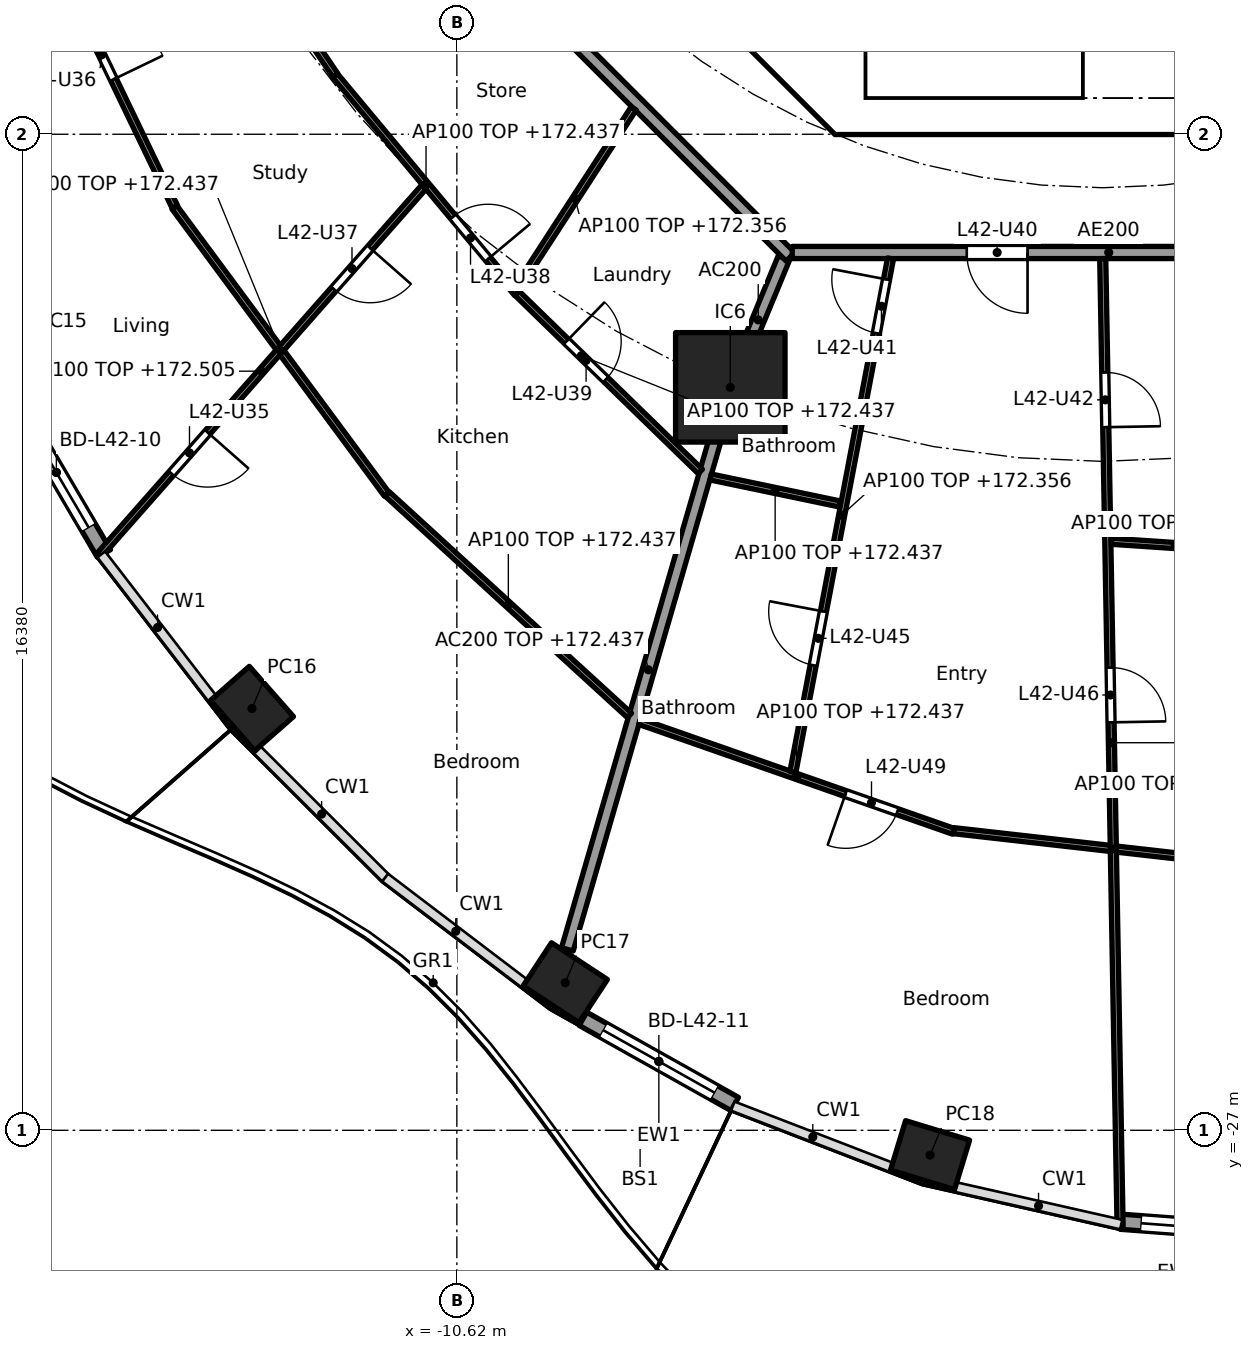
"""IFC4 building model, lengths in metres.
Left out: names, types, materials, properties, quantities, classifications, styles, units other than length and angle.
Written with IfcOpenShell. Run it as: python <this file> out.ifc"""

import sys

from ifc_helpers import new_model, si_unit, direction, frame, frame_2d, origin, origin_2d, place, context, subcontext, project, spatial, polyline, rectangle, hollow_rectangle, outline, extrude, element, fill, save


model = new_model("IFC4")
c1 = context("Model", 3, precision=1e-05, world=origin(), true_north=direction((0.0, 1.0)))
c2 = subcontext(c1, "Body", "Model", "MODEL_VIEW")
j1 = project(units=[si_unit("LENGTHUNIT", "METRE"), si_unit("PLANEANGLEUNIT", "RADIAN")], contexts=[c1])
p1 = place(None, origin())
s1 = spatial("IfcSite", under=j1, at=p1, CompositionType="ELEMENT")
p2 = place(p1, origin())
s2 = spatial("IfcBuilding", under=s1, at=p2, CompositionType="ELEMENT")
p3 = place(p2, frame((0.0, 0.0, 169.6)))
s3 = spatial("IfcBuildingStorey", under=s2, at=p3, CompositionType="ELEMENT", Elevation=169.6)
for number, where, z_axis, x_axis in (
    (1, (-13.989, -20.064, 0.0), (0.0, 0.0, 1.0), (0.66, -0.751, 0.0)),
    (2, (-8.837, -24.573, 0.0), (0.0, 0.0, 1.0), (0.836, -0.549, 0.0)),
    (3, (-2.838, -27.408, 0.0), (0.0, 0.0, 1.0), (0.957, -0.292, 0.0)),
):
    element("IfcColumn", number, at=place(p3, frame(where, z_axis=z_axis, x_axis=x_axis)), inside=s3, PredefinedType="COLUMN", context=c2, shape_type="SweptSolid", body=[
        extrude(hollow_rectangle(XDim=1.1, YDim=0.85, WallThickness=0.036, at=origin_2d()), origin(), (0.0, 0.0, 1.0), 3.7),
    ])
p4 = place(p3, frame((-6.123, -14.782, 0.0), z_axis=(0.0, 0.0, 1.0), x_axis=(1.0, 0.0, 0.0)))
e4 = element("IfcColumn", 4, at=p4, inside=s3, PredefinedType="COLUMN", context=c2, shape_type="SweptSolid", body=[
    extrude(rectangle(XDim=1.8, YDim=1.8, at=origin_2d()), origin(), (0.0, 0.0, 1.0), 3.7),
])
p5 = place(p3, frame((-16.424, -17.515, 0.0), z_axis=(0.0, 0.0, 1.0), x_axis=(-0.506309086483, 0.862352079458, 0.0)))
e5 = element("IfcWall", 5, at=p5, inside=s3, PredefinedType="SOLIDWALL", context=c2, shape_type="SweptSolid", body=[
    extrude(rectangle(XDim=3.092, YDim=0.25, at=frame_2d((1.546, 0.0))), origin(), (0.0, 0.0, 1.0), 3.44),
])
p6 = place(p5, frame((0.496, 0.0, 0.0)))
e6 = element("IfcOpeningElement", 6, at=p6, cuts=e5, PredefinedType="OPENING", context=c2, shape_type="SweptSolid", body=[
    extrude(rectangle(XDim=2.1, YDim=2.4, at=frame_2d((1.05, 1.2))), frame((0.0, 0.135, 0.0), z_axis=(0.0, -1.0, 0.0), x_axis=(1.0, 0.0, 0.0)), (0.0, 0.0, 1.0), 0.27),
])
p7 = place(p3, frame((-6.049, -26.568, 0.0), z_axis=(0.0, 0.0, 1.0), x_axis=(-0.872078262455, 0.489366431371, 0.0)))
e7 = element("IfcWall", 7, at=p7, inside=s3, PredefinedType="SOLIDWALL", context=c2, shape_type="SweptSolid", body=[
    extrude(rectangle(XDim=2.864, YDim=0.25, at=frame_2d((1.432, 0.0))), origin(), (0.0, 0.0, 1.0), 3.44),
])
p8 = place(p7, frame((0.382, 0.0, 0.0)))
e8 = element("IfcOpeningElement", 8, at=p8, cuts=e7, PredefinedType="OPENING", context=c2, shape_type="SweptSolid", body=[
    extrude(rectangle(XDim=2.1, YDim=2.4, at=frame_2d((1.05, 1.2))), frame((0.0, 0.135, 0.0), z_axis=(0.0, -1.0, 0.0), x_axis=(1.0, 0.0, 0.0)), (0.0, 0.0, 1.0), 0.27),
])
p9 = place(p3, frame((3.061, -28.709, 0.0), z_axis=(0.0, 0.0, 1.0), x_axis=(-0.997232064422, 0.074351931305, 0.0)))
e9 = element("IfcWall", 9, at=p9, inside=s3, PredefinedType="SOLIDWALL", context=c2, shape_type="SweptSolid", body=[
    extrude(rectangle(XDim=2.771, YDim=0.25, at=frame_2d((1.386, 0.0))), origin(), (0.0, 0.0, 1.0), 3.44),
])
p10 = place(p9, frame((0.336, 0.0, 0.0)))
e10 = element("IfcOpeningElement", 10, at=p10, cuts=e9, PredefinedType="OPENING", context=c2, shape_type="SweptSolid", body=[
    extrude(rectangle(XDim=2.1, YDim=2.4, at=frame_2d((1.05, 1.2))), frame((0.0, 0.135, 0.0), z_axis=(0.0, -1.0, 0.0), x_axis=(1.0, 0.0, 0.0)), (0.0, 0.0, 1.0), 0.27),
])
p11 = place(p3, frame((-9.988, -4.613, 0.0), z_axis=(0.0, 0.0, 1.0), x_axis=(0.707106781187, -0.707106781187, 0.0)))
e11 = element("IfcWall", 11, at=p11, inside=s3, PredefinedType="SHEAR", context=c2, shape_type="SweptSolid", body=[
    extrude(rectangle(XDim=7.602, YDim=0.6, at=frame_2d((3.801, 0.0))), origin(), (0.0, 0.0, 1.0), 3.44),
])
p12 = place(p11, frame((6.151, 0.0, 0.0)))
e12 = element("IfcOpeningElement", 12, at=p12, cuts=e11, PredefinedType="OPENING", context=c2, shape_type="SweptSolid", body=[
    extrude(rectangle(XDim=1.1, YDim=2.1, at=frame_2d((0.55, 1.05))), frame((0.0, 0.31, 0.0), z_axis=(0.0, -1.0, 0.0), x_axis=(1.0, 0.0, 0.0)), (0.0, 0.0, 1.0), 0.62),
])
p13 = place(p3, origin())
e13 = element("IfcWall", 13, at=p13, inside=s3, PredefinedType="SHEAR", context=c2, shape_type="SweptSolid", body=[
    extrude(outline(polyline([(-4.152, -10.025), (4.152, -10.025), (4.401, -9.776), (4.825, -10.2), (4.401, -10.625), (-4.401, -10.625), (-4.825, -10.2), (-4.401, -9.776), (-4.152, -10.025)])), origin(), (0.0, 0.0, 1.0), 3.44),
])
p14 = place(p3, origin())
e14 = element("IfcWall", 14, at=p14, inside=s3, PredefinedType="SOLIDWALL", context=c2, shape_type="SweptSolid", body=[
    extrude(outline(polyline([(-3.9, -10.025), (-4.1, -10.025), (-4.1, -7.025), (-3.9, -7.025), (-3.9, -10.025)])), origin(), (0.0, 0.0, 1.0), 3.44),
])
p15 = place(p3, frame((-5.243, -12.657, 0.0), z_axis=(0.0, 0.0, 1.0), x_axis=(-0.382707856524, -0.923869415315, 0.0)))
e15 = element("IfcWall", 15, at=p15, inside=s3, PredefinedType="PARTITIONING", context=c2, shape_type="SweptSolid", body=[
    extrude(rectangle(XDim=2.2, YDim=0.2, at=frame_2d((1.1, 0.0))), origin(), (0.0, 0.0, 1.0), 3.44),
])
p16 = place(p3, frame((-6.137, -14.83, 0.0), z_axis=(0.0, 0.0, 1.0), x_axis=(-0.278461169897, -0.96044748782, 0.0)))
e16 = element("IfcWall", 16, at=p16, inside=s3, PredefinedType="PARTITIONING", context=c2, shape_type="SweptSolid", body=[
    extrude(rectangle(XDim=9.573, YDim=0.2, at=frame_2d((4.787, 0.0))), origin(), (0.0, 0.0, 1.0), 2.837),
])
p17 = place(p3, frame((-12.635, -5.134, 0.0), z_axis=(0.0, 0.0, 1.0), x_axis=(0.707106781187, -0.707106781187, 0.0)))
e17 = element("IfcWall", 17, at=p17, inside=s3, PredefinedType="PARTITIONING", context=c2, shape_type="SweptSolid", body=[
    extrude(rectangle(XDim=10.609, YDim=0.2, at=frame_2d((5.305, 0.0))), origin(), (0.0, 0.0, 1.0), 3.44),
])
p18 = place(p3, frame((-5.104, -12.565, 0.0), z_axis=(0.0, 0.0, 1.0), x_axis=(1.0, 0.0, 0.0)))
e18 = element("IfcWall", 18, at=p18, inside=s3, PredefinedType="PARTITIONING", context=c2, shape_type="SweptSolid", body=[
    extrude(rectangle(XDim=10.409, YDim=0.2, at=frame_2d((5.205, 0.0))), origin(), (0.0, 0.0, 1.0), 3.44),
])
p19 = place(p18, frame((2.87, 0.0, 0.0)))
e19 = element("IfcOpeningElement", 19, at=p19, cuts=e18, PredefinedType="OPENING", context=c2, shape_type="SweptSolid", body=[
    extrude(rectangle(XDim=1.0, YDim=2.1, at=frame_2d((0.5, 1.05))), frame((0.0, 0.11, 0.0), z_axis=(0.0, -1.0, 0.0), x_axis=(1.0, 0.0, 0.0)), (0.0, 0.0, 1.0), 0.22),
])
p20 = place(p3, frame((-14.952, -6.208, 0.0), z_axis=(0.0, 0.0, 1.0), x_axis=(0.561064907171, -0.827771810308, 0.0)))
e20 = element("IfcWall", 20, at=p20, inside=s3, PredefinedType="PARTITIONING", context=c2, shape_type="SweptSolid", body=[
    extrude(rectangle(XDim=4.159, YDim=0.1, at=frame_2d((2.079, 0.0))), origin(), (0.0, 0.0, 1.0), 3.44),
])
p21 = place(p3, frame((-17.669, -6.809, 0.0), z_axis=(0.0, 0.0, 1.0), x_axis=(0.434040130629, -0.900893536997, 0.0)))
e21 = element("IfcWall", 21, at=p21, inside=s3, PredefinedType="PARTITIONING", context=c2, shape_type="SweptSolid", body=[
    extrude(rectangle(XDim=5.558, YDim=0.1, at=frame_2d((2.779, 0.0))), origin(), (0.0, 0.0, 1.0), 3.44),
])
p22 = place(p21, frame((2.329, 0.0, 0.0)))
e22 = element("IfcOpeningElement", 22, at=p22, cuts=e21, PredefinedType="OPENING", context=c2, shape_type="SweptSolid", body=[
    extrude(rectangle(XDim=0.9, YDim=2.1, at=frame_2d((0.45, 1.05))), frame((0.0, 0.06, 0.0), z_axis=(0.0, -1.0, 0.0), x_axis=(1.0, 0.0, 0.0)), (0.0, 0.0, 1.0), 0.12),
])
p23 = place(p3, frame((-12.623, -9.653, 0.0), z_axis=(0.0, 0.0, 1.0), x_axis=(0.640297481347, -0.768127030758, 0.0)))
e23 = element("IfcWall", 23, at=p23, inside=s3, PredefinedType="PARTITIONING", context=c2, shape_type="SweptSolid", body=[
    extrude(rectangle(XDim=4.672, YDim=0.1, at=frame_2d((2.336, 0.0))), origin(), (0.0, 0.0, 1.0), 2.837),
])
p24 = place(p23, frame((3.029, 0.0, 0.0)))
e24 = element("IfcOpeningElement", 24, at=p24, cuts=e23, PredefinedType="OPENING", context=c2, shape_type="SweptSolid", body=[
    extrude(rectangle(XDim=0.9, YDim=2.1, at=frame_2d((0.45, 1.05))), frame((0.0, 0.06, 0.0), z_axis=(0.0, -1.0, 0.0), x_axis=(1.0, 0.0, 0.0)), (0.0, 0.0, 1.0), 0.12),
])
p25 = place(p3, frame((-15.265, -11.821, 0.0), z_axis=(0.0, 0.0, 1.0), x_axis=(0.594711348772, -0.803939308432, 0.0)))
e25 = element("IfcWall", 25, at=p25, inside=s3, PredefinedType="PARTITIONING", context=c2, shape_type="SweptSolid", body=[
    extrude(rectangle(XDim=5.872, YDim=0.1, at=frame_2d((2.936, 0.0))), origin(), (0.0, 0.0, 1.0), 2.837),
])
p26 = place(p3, frame((-11.16, -11.485, 0.0), z_axis=(0.0, 0.0, 1.0), x_axis=(-0.661275898802, -0.750142776852, 0.0)))
e26 = element("IfcWall", 26, at=p26, inside=s3, PredefinedType="PARTITIONING", context=c2, shape_type="SweptSolid", body=[
    extrude(rectangle(XDim=8.083, YDim=0.1, at=frame_2d((4.041, 0.0))), origin(), (0.0, 0.0, 1.0), 2.905),
])
p27 = place(p26, frame((5.382, 0.0, 0.0)))
e27 = element("IfcOpeningElement", 27, at=p27, cuts=e26, PredefinedType="OPENING", context=c2, shape_type="SweptSolid", body=[
    extrude(rectangle(XDim=0.9, YDim=2.1, at=frame_2d((0.45, 1.05))), frame((0.0, 0.06, 0.0), z_axis=(0.0, -1.0, 0.0), x_axis=(1.0, 0.0, 0.0)), (0.0, 0.0, 1.0), 0.12),
])
p28 = place(p26, frame((1.341, 0.0, 0.0)))
e28 = element("IfcOpeningElement", 28, at=p28, cuts=e26, PredefinedType="OPENING", context=c2, shape_type="SweptSolid", body=[
    extrude(rectangle(XDim=0.9, YDim=2.1, at=frame_2d((0.45, 1.05))), frame((0.0, 0.06, 0.0), z_axis=(0.0, -1.0, 0.0), x_axis=(1.0, 0.0, 0.0)), (0.0, 0.0, 1.0), 0.12),
])
p29 = place(p3, frame((-7.712, -10.195, 0.0), z_axis=(0.0, 0.0, 1.0), x_axis=(-0.544170086001, -0.838974920663, 0.0)))
e29 = element("IfcWall", 29, at=p29, inside=s3, PredefinedType="PARTITIONING", context=c2, shape_type="SweptSolid", body=[
    extrude(rectangle(XDim=3.535, YDim=0.1, at=frame_2d((1.768, 0.0))), origin(), (0.0, 0.0, 1.0), 2.756),
])
p30 = place(p3, frame((-9.627, -13.238, 0.0), z_axis=(0.0, 0.0, 1.0), x_axis=(0.716919058692, -0.697156412352, 0.0)))
e30 = element("IfcWall", 30, at=p30, inside=s3, PredefinedType="PARTITIONING", context=c2, shape_type="SweptSolid", body=[
    extrude(rectangle(XDim=4.2, YDim=0.1, at=frame_2d((2.1, 0.0))), origin(), (0.0, 0.0, 1.0), 2.837),
])
p31 = place(p30, frame((1.13, 0.0, 0.0)))
e31 = element("IfcOpeningElement", 31, at=p31, cuts=e30, PredefinedType="OPENING", context=c2, shape_type="SweptSolid", body=[
    extrude(rectangle(XDim=0.9, YDim=2.1, at=frame_2d((0.45, 1.05))), frame((0.0, 0.06, 0.0), z_axis=(0.0, -1.0, 0.0), x_axis=(1.0, 0.0, 0.0)), (0.0, 0.0, 1.0), 0.12),
])
p32 = place(p3, frame((-11.766, -16.535, 0.0), z_axis=(0.0, 0.0, 1.0), x_axis=(0.73807320557, -0.674720640872, 0.0)))
e32 = element("IfcWall", 32, at=p32, inside=s3, PredefinedType="PARTITIONING", context=c2, shape_type="SweptSolid", body=[
    extrude(rectangle(XDim=5.399, YDim=0.1, at=frame_2d((2.699, 0.0))), origin(), (0.0, 0.0, 1.0), 2.837),
])
p33 = place(p3, frame((-6.447, -16.256, 0.0), z_axis=(0.0, 0.0, 1.0), x_axis=(0.978909151576, -0.204296042448, 0.0)))
e33 = element("IfcWall", 33, at=p33, inside=s3, PredefinedType="PARTITIONING", context=c2, shape_type="SweptSolid", body=[
    extrude(rectangle(XDim=2.168, YDim=0.1, at=frame_2d((1.084, 0.0))), origin(), (0.0, 0.0, 1.0), 2.837),
])
p34 = place(p3, frame((-7.613, -20.278, 0.0), z_axis=(0.0, 0.0, 1.0), x_axis=(0.943918212431, -0.330179357684, 0.0)))
e34 = element("IfcWall", 34, at=p34, inside=s3, PredefinedType="PARTITIONING", context=c2, shape_type="SweptSolid", body=[
    extrude(rectangle(XDim=5.467, YDim=0.1, at=frame_2d((2.734, 0.0))), origin(), (0.0, 0.0, 1.0), 2.837),
])
p35 = place(p34, frame((3.588, 0.0, 0.0)))
e35 = element("IfcOpeningElement", 35, at=p35, cuts=e34, PredefinedType="OPENING", context=c2, shape_type="SweptSolid", body=[
    extrude(rectangle(XDim=0.9, YDim=2.1, at=frame_2d((0.45, 1.05))), frame((0.0, 0.06, 0.0), z_axis=(0.0, -1.0, 0.0), x_axis=(1.0, 0.0, 0.0)), (0.0, 0.0, 1.0), 0.12),
])
p36 = place(p3, frame((-3.488, -12.663, 0.0), z_axis=(0.0, 0.0, 1.0), x_axis=(-0.186783185485, -0.982401161247, 0.0)))
e36 = element("IfcWall", 36, at=p36, inside=s3, PredefinedType="PARTITIONING", context=c2, shape_type="SweptSolid", body=[
    extrude(rectangle(XDim=8.595, YDim=0.1, at=frame_2d((4.298, 0.0))), origin(), (0.0, 0.0, 1.0), 2.756),
])
p37 = place(p36, frame((0.35, 0.0, 0.0)))
e37 = element("IfcOpeningElement", 37, at=p37, cuts=e36, PredefinedType="OPENING", context=c2, shape_type="SweptSolid", body=[
    extrude(rectangle(XDim=0.9, YDim=2.1, at=frame_2d((0.45, 1.05))), frame((0.0, 0.06, 0.0), z_axis=(0.0, -1.0, 0.0), x_axis=(1.0, 0.0, 0.0)), (0.0, 0.0, 1.0), 0.12),
])
p38 = place(p36, frame((5.908, 0.0, 0.0)))
e38 = element("IfcOpeningElement", 38, at=p38, cuts=e36, PredefinedType="OPENING", context=c2, shape_type="SweptSolid", body=[
    extrude(rectangle(XDim=0.9, YDim=2.1, at=frame_2d((0.45, 1.05))), frame((0.0, 0.06, 0.0), z_axis=(0.0, -1.0, 0.0), x_axis=(1.0, 0.0, 0.0)), (0.0, 0.0, 1.0), 0.12),
])
p39 = place(p3, frame((-2.449, -22.073, 0.0), z_axis=(0.0, 0.0, 1.0), x_axis=(0.993660315081, -0.112424099879, 0.0)))
e39 = element("IfcWall", 39, at=p39, inside=s3, PredefinedType="PARTITIONING", context=c2, shape_type="SweptSolid", body=[
    extrude(rectangle(XDim=5.325, YDim=0.1, at=frame_2d((2.662, 0.0))), origin(), (0.0, 0.0, 1.0), 2.837),
])
p40 = place(p3, frame((0.002, -12.665, 0.0), z_axis=(0.0, 0.0, 1.0), x_axis=(0.01792079652, -0.999839409631, 0.0)))
e40 = element("IfcWall", 40, at=p40, inside=s3, PredefinedType="PARTITIONING", context=c2, shape_type="SweptSolid", body=[
    extrude(rectangle(XDim=15.926, YDim=0.1, at=frame_2d((7.963, 0.0))), origin(), (0.0, 0.0, 1.0), 2.756),
])
p41 = place(p40, frame((1.873, 0.0, 0.0)))
e41 = element("IfcOpeningElement", 41, at=p41, cuts=e40, PredefinedType="OPENING", context=c2, shape_type="SweptSolid", body=[
    extrude(rectangle(XDim=0.9, YDim=2.1, at=frame_2d((0.45, 1.05))), frame((0.0, 0.06, 0.0), z_axis=(0.0, -1.0, 0.0), x_axis=(1.0, 0.0, 0.0)), (0.0, 0.0, 1.0), 0.12),
])
p42 = place(p40, frame((6.728, 0.0, 0.0)))
e42 = element("IfcOpeningElement", 42, at=p42, cuts=e40, PredefinedType="OPENING", context=c2, shape_type="SweptSolid", body=[
    extrude(rectangle(XDim=0.9, YDim=2.1, at=frame_2d((0.45, 1.05))), frame((0.0, 0.06, 0.0), z_axis=(0.0, -1.0, 0.0), x_axis=(1.0, 0.0, 0.0)), (0.0, 0.0, 1.0), 0.12),
])
p43 = place(p3, frame((0.145, -17.314, 0.0), z_axis=(0.0, 0.0, 1.0), x_axis=(0.997756833447, -0.06694252243, 0.0)))
e43 = element("IfcWall", 43, at=p43, inside=s3, PredefinedType="PARTITIONING", context=c2, shape_type="SweptSolid", body=[
    extrude(rectangle(XDim=2.104, YDim=0.1, at=frame_2d((1.052, 0.0))), origin(), (0.0, 0.0, 1.0), 2.837),
])
p44 = place(p6, origin())
e44 = element("IfcDoor", 44, at=p44, inside=s3, OperationType="SLIDING_TO_LEFT", PredefinedType="DOOR", context=c2, shape_type="SweptSolid", body=[
    extrude(rectangle(XDim=2.1, YDim=2.4, at=frame_2d((1.05, 1.2))), frame((0.0, 0.025, 0.0), z_axis=(0.0, -1.0, 0.0), x_axis=(1.0, 0.0, 0.0)), (0.0, 0.0, 1.0), 0.05),
])
fill(e6, e44)
p45 = place(p8, origin())
e45 = element("IfcDoor", 45, at=p45, inside=s3, OperationType="SLIDING_TO_LEFT", PredefinedType="DOOR", context=c2, shape_type="SweptSolid", body=[
    extrude(rectangle(XDim=2.1, YDim=2.4, at=frame_2d((1.05, 1.2))), frame((0.0, 0.025, 0.0), z_axis=(0.0, -1.0, 0.0), x_axis=(1.0, 0.0, 0.0)), (0.0, 0.0, 1.0), 0.05),
])
fill(e8, e45)
p46 = place(p10, origin())
e46 = element("IfcDoor", 46, at=p46, inside=s3, OperationType="SLIDING_TO_LEFT", PredefinedType="DOOR", context=c2, shape_type="SweptSolid", body=[
    extrude(rectangle(XDim=2.1, YDim=2.4, at=frame_2d((1.05, 1.2))), frame((0.0, 0.025, 0.0), z_axis=(0.0, -1.0, 0.0), x_axis=(1.0, 0.0, 0.0)), (0.0, 0.0, 1.0), 0.05),
])
fill(e10, e46)
p47 = place(p12, origin())
e47 = element("IfcDoor", 47, at=p47, inside=s3, OperationType="SINGLE_SWING_RIGHT", PredefinedType="DOOR", context=c2, shape_type="SweptSolid", body=[
    extrude(rectangle(XDim=1.1, YDim=2.1, at=frame_2d((0.55, 1.05))), frame((0.0, 0.025, 0.0), z_axis=(0.0, -1.0, 0.0), x_axis=(1.0, 0.0, 0.0)), (0.0, 0.0, 1.0), 0.05),
])
fill(e12, e47)
p48 = place(p27, origin())
e48 = element("IfcDoor", 48, at=p48, inside=s3, OperationType="SINGLE_SWING_LEFT", PredefinedType="DOOR", context=c2, shape_type="SweptSolid", body=[
    extrude(rectangle(XDim=0.9, YDim=2.1, at=frame_2d((0.45, 1.05))), frame((0.0, 0.025, 0.0), z_axis=(0.0, -1.0, 0.0), x_axis=(1.0, 0.0, 0.0)), (0.0, 0.0, 1.0), 0.05),
])
fill(e27, e48)
p49 = place(p22, origin())
e49 = element("IfcDoor", 49, at=p49, inside=s3, OperationType="SINGLE_SWING_RIGHT", PredefinedType="DOOR", context=c2, shape_type="SweptSolid", body=[
    extrude(rectangle(XDim=0.9, YDim=2.1, at=frame_2d((0.45, 1.05))), frame((0.0, 0.025, 0.0), z_axis=(0.0, -1.0, 0.0), x_axis=(1.0, 0.0, 0.0)), (0.0, 0.0, 1.0), 0.05),
])
fill(e22, e49)
p50 = place(p28, origin())
e50 = element("IfcDoor", 50, at=p50, inside=s3, OperationType="SINGLE_SWING_LEFT", PredefinedType="DOOR", context=c2, shape_type="SweptSolid", body=[
    extrude(rectangle(XDim=0.9, YDim=2.1, at=frame_2d((0.45, 1.05))), frame((0.0, 0.025, 0.0), z_axis=(0.0, -1.0, 0.0), x_axis=(1.0, 0.0, 0.0)), (0.0, 0.0, 1.0), 0.05),
])
fill(e28, e50)
p51 = place(p24, origin())
e51 = element("IfcDoor", 51, at=p51, inside=s3, OperationType="SINGLE_SWING_RIGHT", PredefinedType="DOOR", context=c2, shape_type="SweptSolid", body=[
    extrude(rectangle(XDim=0.9, YDim=2.1, at=frame_2d((0.45, 1.05))), frame((0.0, 0.025, 0.0), z_axis=(0.0, -1.0, 0.0), x_axis=(1.0, 0.0, 0.0)), (0.0, 0.0, 1.0), 0.05),
])
fill(e24, e51)
p52 = place(p31, origin())
e52 = element("IfcDoor", 52, at=p52, inside=s3, OperationType="SINGLE_SWING_LEFT", PredefinedType="DOOR", context=c2, shape_type="SweptSolid", body=[
    extrude(rectangle(XDim=0.9, YDim=2.1, at=frame_2d((0.45, 1.05))), frame((0.0, 0.025, 0.0), z_axis=(0.0, -1.0, 0.0), x_axis=(1.0, 0.0, 0.0)), (0.0, 0.0, 1.0), 0.05),
])
fill(e31, e52)
p53 = place(p19, frame((1.0, 0.0, 0.0), x_axis=(-1.0, 0.0, 0.0)))
e53 = element("IfcDoor", 53, at=p53, inside=s3, OperationType="SINGLE_SWING_LEFT", PredefinedType="DOOR", context=c2, shape_type="SweptSolid", body=[
    extrude(rectangle(XDim=1.0, YDim=2.1, at=frame_2d((0.5, 1.05))), frame((0.0, 0.025, 0.0), z_axis=(0.0, -1.0, 0.0), x_axis=(1.0, 0.0, 0.0)), (0.0, 0.0, 1.0), 0.05),
])
fill(e19, e53)
p54 = place(p37, frame((0.9, 0.0, 0.0), x_axis=(-1.0, 0.0, 0.0)))
e54 = element("IfcDoor", 54, at=p54, inside=s3, OperationType="SINGLE_SWING_RIGHT", PredefinedType="DOOR", context=c2, shape_type="SweptSolid", body=[
    extrude(rectangle(XDim=0.9, YDim=2.1, at=frame_2d((0.45, 1.05))), frame((0.0, 0.025, 0.0), z_axis=(0.0, -1.0, 0.0), x_axis=(1.0, 0.0, 0.0)), (0.0, 0.0, 1.0), 0.05),
])
fill(e37, e54)
p55 = place(p41, origin())
e55 = element("IfcDoor", 55, at=p55, inside=s3, OperationType="SINGLE_SWING_RIGHT", PredefinedType="DOOR", context=c2, shape_type="SweptSolid", body=[
    extrude(rectangle(XDim=0.9, YDim=2.1, at=frame_2d((0.45, 1.05))), frame((0.0, 0.025, 0.0), z_axis=(0.0, -1.0, 0.0), x_axis=(1.0, 0.0, 0.0)), (0.0, 0.0, 1.0), 0.05),
])
fill(e41, e55)
p56 = place(p38, frame((0.9, 0.0, 0.0), x_axis=(-1.0, 0.0, 0.0)))
e56 = element("IfcDoor", 56, at=p56, inside=s3, OperationType="SINGLE_SWING_RIGHT", PredefinedType="DOOR", context=c2, shape_type="SweptSolid", body=[
    extrude(rectangle(XDim=0.9, YDim=2.1, at=frame_2d((0.45, 1.05))), frame((0.0, 0.025, 0.0), z_axis=(0.0, -1.0, 0.0), x_axis=(1.0, 0.0, 0.0)), (0.0, 0.0, 1.0), 0.05),
])
fill(e38, e56)
p57 = place(p42, origin())
e57 = element("IfcDoor", 57, at=p57, inside=s3, OperationType="SINGLE_SWING_RIGHT", PredefinedType="DOOR", context=c2, shape_type="SweptSolid", body=[
    extrude(rectangle(XDim=0.9, YDim=2.1, at=frame_2d((0.45, 1.05))), frame((0.0, 0.025, 0.0), z_axis=(0.0, -1.0, 0.0), x_axis=(1.0, 0.0, 0.0)), (0.0, 0.0, 1.0), 0.05),
])
fill(e42, e57)
p58 = place(p35, frame((0.9, 0.0, 0.0), x_axis=(-1.0, 0.0, 0.0)))
e58 = element("IfcDoor", 58, at=p58, inside=s3, OperationType="SINGLE_SWING_RIGHT", PredefinedType="DOOR", context=c2, shape_type="SweptSolid", body=[
    extrude(rectangle(XDim=0.9, YDim=2.1, at=frame_2d((0.45, 1.05))), frame((0.0, 0.025, 0.0), z_axis=(0.0, -1.0, 0.0), x_axis=(1.0, 0.0, 0.0)), (0.0, 0.0, 1.0), 0.05),
])
fill(e35, e58)
save(model, sys.argv[1])
